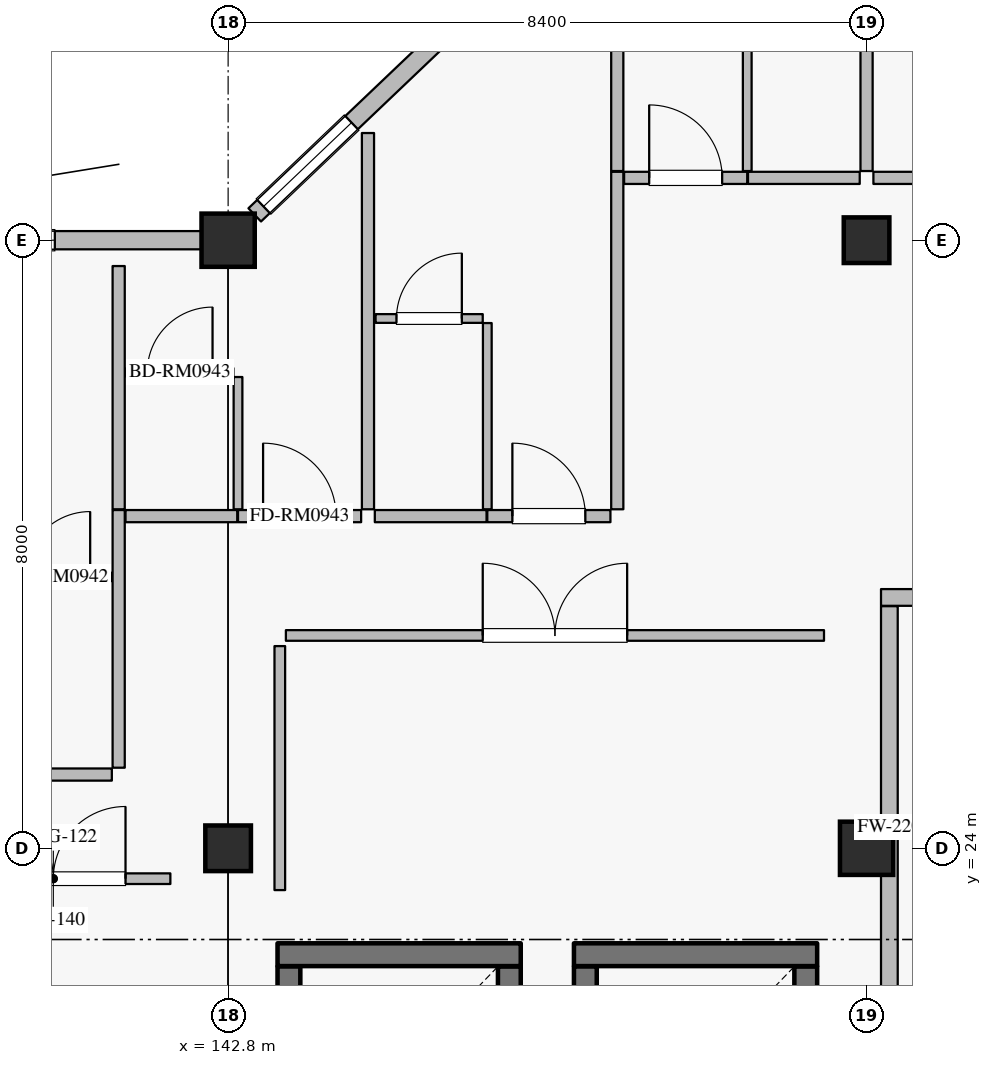
"""IFC4 building model, lengths in metres.
Left out: names, types, materials, properties, quantities, classifications, styles, units other than length and angle.
Written with IfcOpenShell. Run it as: python <this file> out.ifc"""

import sys

from ifc_helpers import new_model, si_unit, direction, frame, frame_2d, origin, origin_2d, place, context, subcontext, project, spatial, rectangle, extrude, element, fill, save


model = new_model("IFC4")
c1 = context("Model", 3, precision=1e-05, world=origin(), true_north=direction((0.0, 1.0)))
c2 = subcontext(c1, "Body", "Model", "MODEL_VIEW")
j1 = project(units=[si_unit("LENGTHUNIT", "METRE"), si_unit("PLANEANGLEUNIT", "RADIAN")], contexts=[c1])
p1 = place(None, origin())
s1 = spatial("IfcSite", under=j1, at=p1, CompositionType="ELEMENT")
p2 = place(p1, origin())
s2 = spatial("IfcBuilding", under=s1, at=p2, CompositionType="ELEMENT")
p3 = place(p2, frame((0.0, 0.0, 36.0)))
s3 = spatial("IfcBuildingStorey", under=s2, at=p3, CompositionType="ELEMENT", Elevation=36.0)
for number, where, z_axis, x_axis in (
    (1, (142.8, 32.0, 0.0), (0.0, 0.0, 1.0), (1.0, 0.0, 0.0)),
    (2, (151.2, 24.0, 0.0), (0.0, 0.0, 1.0), (1.0, 0.0, 0.0)),
):
    element("IfcColumn", number, at=place(p3, frame(where, z_axis=z_axis, x_axis=x_axis)), inside=s3, PredefinedType="COLUMN", context=c2, shape_type="SweptSolid", body=[
        extrude(rectangle(XDim=0.7, YDim=0.7, at=origin_2d()), origin(), (0.0, 0.0, 1.0), 3.6),
    ])
for number, where, z_axis, x_axis in (
    (3, (142.8, 24.0, 0.0), (0.0, 0.0, 1.0), (1.0, 0.0, 0.0)),
    (4, (151.2, 32.0, 0.0), (0.0, 0.0, 1.0), (1.0, 0.0, 0.0)),
):
    element("IfcColumn", number, at=place(p3, frame(where, z_axis=z_axis, x_axis=x_axis)), inside=s3, PredefinedType="COLUMN", context=c2, shape_type="SweptSolid", body=[
        extrude(rectangle(XDim=0.6, YDim=0.6, at=origin_2d()), origin(), (0.0, 0.0, 1.0), 3.6),
    ])
p4 = place(p3, frame((134.75, 32.0, 0.0), z_axis=(0.0, 0.0, 1.0), x_axis=(1.0, 0.0, 0.0)))
e5 = element("IfcWall", 5, at=p4, inside=s3, PredefinedType="SOLIDWALL", context=c2, shape_type="SweptSolid", body=[
    extrude(rectangle(XDim=7.7, YDim=0.24, at=frame_2d((3.85, 0.0))), origin(), (0.0, 0.0, 1.0), 2.94),
])
p5 = place(p4, frame((0.89, 0.0, 0.8)))
e6 = element("IfcOpeningElement", 6, at=p5, cuts=e5, PredefinedType="OPENING", context=c2, shape_type="SweptSolid", body=[
    extrude(rectangle(XDim=1.6, YDim=1.6, at=frame_2d((0.8, 0.8))), frame((0.0, 0.13, 0.0), z_axis=(0.0, -1.0, 0.0), x_axis=(1.0, 0.0, 0.0)), (0.0, 0.0, 1.0), 0.26),
])
p6 = place(p4, frame((4.17, 0.0, 0.8)))
e7 = element("IfcOpeningElement", 7, at=p6, cuts=e5, PredefinedType="OPENING", context=c2, shape_type="SweptSolid", body=[
    extrude(rectangle(XDim=1.6, YDim=1.6, at=frame_2d((0.8, 0.8))), frame((0.0, 0.13, 0.0), z_axis=(0.0, -1.0, 0.0), x_axis=(1.0, 0.0, 0.0)), (0.0, 0.0, 1.0), 0.26),
])
p7 = place(p3, frame((143.15, 32.333, 0.0), z_axis=(0.0, 0.0, 1.0), x_axis=(0.724116091282, 0.689678103427, 0.0)))
e8 = element("IfcWall", 8, at=p7, inside=s3, PredefinedType="SOLIDWALL", context=c2, shape_type="SweptSolid", body=[
    extrude(rectangle(XDim=10.634, YDim=0.24, at=frame_2d((5.317, 0.0))), origin(), (0.0, 0.0, 1.0), 2.94),
])
p8 = place(p7, frame((0.16, 0.0, 0.8)))
e9 = element("IfcOpeningElement", 9, at=p8, cuts=e8, PredefinedType="OPENING", context=c2, shape_type="SweptSolid", body=[
    extrude(rectangle(XDim=1.6, YDim=1.6, at=frame_2d((0.8, 0.8))), frame((0.0, 0.13, 0.0), z_axis=(0.0, -1.0, 0.0), x_axis=(1.0, 0.0, 0.0)), (0.0, 0.0, 1.0), 0.26),
])
p9 = place(p7, frame((3.523, 0.0, 0.8)))
e10 = element("IfcOpeningElement", 10, at=p9, cuts=e8, PredefinedType="OPENING", context=c2, shape_type="SweptSolid", body=[
    extrude(rectangle(XDim=1.6, YDim=1.6, at=frame_2d((0.8, 0.8))), frame((0.0, 0.13, 0.0), z_axis=(0.0, -1.0, 0.0), x_axis=(1.0, 0.0, 0.0)), (0.0, 0.0, 1.0), 0.26),
])
p10 = place(p7, frame((7.88, 0.0, 0.8)))
e11 = element("IfcOpeningElement", 11, at=p10, cuts=e8, PredefinedType="OPENING", context=c2, shape_type="SweptSolid", body=[
    extrude(rectangle(XDim=1.6, YDim=1.6, at=frame_2d((0.8, 0.8))), frame((0.0, 0.13, 0.0), z_axis=(0.0, -1.0, 0.0), x_axis=(1.0, 0.0, 0.0)), (0.0, 0.0, 1.0), 0.26),
])
p11 = place(p3, frame((146.5, 19.755, 0.0), z_axis=(0.0, 0.0, 1.0), x_axis=(0.0, 1.0, 0.0)))
e12 = element("IfcWall", 12, at=p11, inside=s3, PredefinedType="SHEAR", context=c2, shape_type="SweptSolid", body=[
    extrude(rectangle(XDim=2.69, YDim=0.3, at=frame_2d((1.345, 0.0))), origin(), (0.0, 0.0, 1.0), 3.365),
])
p12 = place(p3, frame((146.65, 22.6, 0.0), z_axis=(0.0, 0.0, 1.0), x_axis=(-1.0, 0.0, 0.0)))
e13 = element("IfcWall", 13, at=p12, inside=s3, PredefinedType="SHEAR", context=c2, shape_type="SweptSolid", body=[
    extrude(rectangle(XDim=3.2, YDim=0.3, at=frame_2d((1.6, 0.0))), origin(), (0.0, 0.0, 1.0), 3.365),
])
for number, where, z_axis, x_axis in (
    (14, (143.6, 22.445, 0.0), (0.0, 0.0, 1.0), (0.0, -1.0, 0.0)),
    (15, (150.4, 19.755, 0.0), (0.0, 0.0, 1.0), (0.0, 1.0, 0.0)),
):
    element("IfcWall", number, at=place(p3, frame(where, z_axis=z_axis, x_axis=x_axis)), inside=s3, PredefinedType="SHEAR", context=c2, shape_type="SweptSolid", body=[
        extrude(rectangle(XDim=2.69, YDim=0.3, at=frame_2d((1.345, 0.0))), origin(), (0.0, 0.0, 1.0), 3.365),
    ])
p13 = place(p3, frame((150.55, 22.6, 0.0), z_axis=(0.0, 0.0, 1.0), x_axis=(-1.0, 0.0, 0.0)))
e16 = element("IfcWall", 16, at=p13, inside=s3, PredefinedType="SHEAR", context=c2, shape_type="SweptSolid", body=[
    extrude(rectangle(XDim=3.2, YDim=0.3, at=frame_2d((1.6, 0.0))), origin(), (0.0, 0.0, 1.0), 3.365),
])
p14 = place(p3, frame((147.5, 22.445, 0.0), z_axis=(0.0, 0.0, 1.0), x_axis=(0.0, -1.0, 0.0)))
e17 = element("IfcWall", 17, at=p14, inside=s3, PredefinedType="SHEAR", context=c2, shape_type="SweptSolid", body=[
    extrude(rectangle(XDim=2.69, YDim=0.3, at=frame_2d((1.345, 0.0))), origin(), (0.0, 0.0, 1.0), 3.365),
])
p15 = place(p3, frame((151.5, 21.365, 0.0), z_axis=(0.0, 0.0, 1.0), x_axis=(0.0, 1.0, 0.0)))
e18 = element("IfcWall", 18, at=p15, inside=s3, PredefinedType="PARTITIONING", context=c2, shape_type="SweptSolid", body=[
    extrude(rectangle(XDim=5.82, YDim=0.22, at=frame_2d((2.91, 0.0))), origin(), (0.0, 0.0, 1.0), 3.365),
])
p16 = place(p3, frame((151.39, 27.3, 0.0), z_axis=(0.0, 0.0, 1.0), x_axis=(1.0, 0.0, 0.0)))
e19 = element("IfcWall", 19, at=p16, inside=s3, PredefinedType="PARTITIONING", context=c2, shape_type="SweptSolid", body=[
    extrude(rectangle(XDim=3.82, YDim=0.22, at=frame_2d((1.91, 0.0))), origin(), (0.0, 0.0, 1.0), 3.365),
])
p17 = place(p16, frame((1.35, 0.0, 0.0)))
e20 = element("IfcOpeningElement", 20, at=p17, cuts=e19, PredefinedType="OPENING", context=c2, shape_type="SweptSolid", body=[
    extrude(rectangle(XDim=1.12, YDim=2.2, at=frame_2d((0.56, 1.1))), frame((0.0, 0.12, 0.0), z_axis=(0.0, -1.0, 0.0), x_axis=(1.0, 0.0, 0.0)), (0.0, 0.0, 1.0), 0.24),
])
p18 = place(p3, frame((139.8, 24.97, 0.0), z_axis=(0.0, 0.0, 1.0), x_axis=(1.0, 0.0, 0.0)))
e21 = element("IfcWall", 21, at=p18, inside=s3, PredefinedType="PARTITIONING", context=c2, shape_type="SweptSolid", body=[
    extrude(rectangle(XDim=1.47, YDim=0.16, at=frame_2d((0.735, 0.0))), origin(), (0.0, 0.0, 1.0), 3.365),
])
p19 = place(p3, frame((139.85, 27.57, 0.0), z_axis=(0.0, 0.0, 1.0), x_axis=(1.0, 0.0, 0.0)))
e22 = element("IfcWall", 22, at=p19, inside=s3, PredefinedType="PARTITIONING", context=c2, shape_type="SweptSolid", body=[
    extrude(rectangle(XDim=1.41, YDim=0.115, at=frame_2d((0.705, 0.0))), origin(), (0.0, 0.0, 1.0), 3.365),
])
p20 = place(p19, frame((0.275, 0.0, 0.0)))
e23 = element("IfcOpeningElement", 23, at=p20, cuts=e22, PredefinedType="OPENING", context=c2, shape_type="SweptSolid", body=[
    extrude(rectangle(XDim=0.86, YDim=2.12, at=frame_2d((0.43, 1.06))), frame((0.0, 0.067, 0.0), z_axis=(0.0, -1.0, 0.0), x_axis=(1.0, 0.0, 0.0)), (0.0, 0.0, 1.0), 0.135),
])
p21 = place(p3, frame((141.36, 25.06, 0.0), z_axis=(0.0, 0.0, 1.0), x_axis=(0.0, 1.0, 0.0)))
e24 = element("IfcWall", 24, at=p21, inside=s3, PredefinedType="PARTITIONING", context=c2, shape_type="SweptSolid", body=[
    extrude(rectangle(XDim=3.39, YDim=0.16, at=frame_2d((1.695, 0.0))), origin(), (0.0, 0.0, 1.0), 3.365),
])
p22 = place(p3, frame((141.45, 28.37, 0.0), z_axis=(0.0, 0.0, 1.0), x_axis=(1.0, 0.0, 0.0)))
e25 = element("IfcWall", 25, at=p22, inside=s3, PredefinedType="PARTITIONING", context=c2, shape_type="SweptSolid", body=[
    extrude(rectangle(XDim=1.47, YDim=0.16, at=frame_2d((0.735, 0.0))), origin(), (0.0, 0.0, 1.0), 3.365),
])
p23 = place(p3, frame((142.93, 28.37, 0.0), z_axis=(0.0, 0.0, 1.0), x_axis=(1.0, 0.0, 0.0)))
e26 = element("IfcWall", 26, at=p23, inside=s3, PredefinedType="PARTITIONING", context=c2, shape_type="SweptSolid", body=[
    extrude(rectangle(XDim=1.62, YDim=0.16, at=frame_2d((0.81, 0.0))), origin(), (0.0, 0.0, 1.0), 3.365),
])
p24 = place(p23, frame((0.33, 0.0, 0.0)))
e27 = element("IfcOpeningElement", 27, at=p24, cuts=e26, PredefinedType="OPENING", context=c2, shape_type="SweptSolid", body=[
    extrude(rectangle(XDim=0.96, YDim=2.2, at=frame_2d((0.48, 1.1))), frame((0.0, 0.09, 0.0), z_axis=(0.0, -1.0, 0.0), x_axis=(1.0, 0.0, 0.0)), (0.0, 0.0, 1.0), 0.18),
])
p25 = place(p3, frame((142.93, 28.46, 0.0), z_axis=(0.0, 0.0, 1.0), x_axis=(0.0, 1.0, 0.0)))
e28 = element("IfcWall", 28, at=p25, inside=s3, PredefinedType="PARTITIONING", context=c2, shape_type="SweptSolid", body=[
    extrude(rectangle(XDim=1.74, YDim=0.115, at=frame_2d((0.87, 0.0))), origin(), (0.0, 0.0, 1.0), 2.74),
])
p26 = place(p3, frame((141.46, 30.26, 0.0), z_axis=(0.0, 0.0, 1.0), x_axis=(1.0, 0.0, 0.0)))
e29 = element("IfcWall", 29, at=p26, inside=s3, PredefinedType="PARTITIONING", context=c2, shape_type="SweptSolid", body=[
    extrude(rectangle(XDim=1.41, YDim=0.115, at=frame_2d((0.705, 0.0))), origin(), (0.0, 0.0, 1.0), 3.365),
])
p27 = place(p26, frame((0.275, 0.0, 0.0)))
e30 = element("IfcOpeningElement", 30, at=p27, cuts=e29, PredefinedType="OPENING", context=c2, shape_type="SweptSolid", body=[
    extrude(rectangle(XDim=0.86, YDim=2.12, at=frame_2d((0.43, 1.06))), frame((0.0, 0.067, 0.0), z_axis=(0.0, -1.0, 0.0), x_axis=(1.0, 0.0, 0.0)), (0.0, 0.0, 1.0), 0.135),
])
p28 = place(p3, frame((141.36, 28.46, 0.0), z_axis=(0.0, 0.0, 1.0), x_axis=(0.0, 1.0, 0.0)))
e31 = element("IfcWall", 31, at=p28, inside=s3, PredefinedType="PARTITIONING", context=c2, shape_type="SweptSolid", body=[
    extrude(rectangle(XDim=3.2, YDim=0.16, at=frame_2d((1.6, 0.0))), origin(), (0.0, 0.0, 1.0), 3.365),
])
p29 = place(p3, frame((144.73, 28.37, 0.0), z_axis=(0.0, 0.0, 1.0), x_axis=(1.0, 0.0, 0.0)))
e32 = element("IfcWall", 32, at=p29, inside=s3, PredefinedType="PARTITIONING", context=c2, shape_type="SweptSolid", body=[
    extrude(rectangle(XDim=1.47, YDim=0.16, at=frame_2d((0.735, 0.0))), origin(), (0.0, 0.0, 1.0), 3.365),
])
p30 = place(p3, frame((146.21, 28.37, 0.0), z_axis=(0.0, 0.0, 1.0), x_axis=(1.0, 0.0, 0.0)))
e33 = element("IfcWall", 33, at=p30, inside=s3, PredefinedType="PARTITIONING", context=c2, shape_type="SweptSolid", body=[
    extrude(rectangle(XDim=1.62, YDim=0.16, at=frame_2d((0.81, 0.0))), origin(), (0.0, 0.0, 1.0), 3.365),
])
p31 = place(p30, frame((0.33, 0.0, 0.0)))
e34 = element("IfcOpeningElement", 34, at=p31, cuts=e33, PredefinedType="OPENING", context=c2, shape_type="SweptSolid", body=[
    extrude(rectangle(XDim=0.96, YDim=2.2, at=frame_2d((0.48, 1.1))), frame((0.0, 0.09, 0.0), z_axis=(0.0, -1.0, 0.0), x_axis=(1.0, 0.0, 0.0)), (0.0, 0.0, 1.0), 0.18),
])
p32 = place(p3, frame((146.21, 28.46, 0.0), z_axis=(0.0, 0.0, 1.0), x_axis=(0.0, 1.0, 0.0)))
e35 = element("IfcWall", 35, at=p32, inside=s3, PredefinedType="PARTITIONING", context=c2, shape_type="SweptSolid", body=[
    extrude(rectangle(XDim=2.45, YDim=0.115, at=frame_2d((1.225, 0.0))), origin(), (0.0, 0.0, 1.0), 3.365),
])
p33 = place(p3, frame((144.74, 30.97, 0.0), z_axis=(0.0, 0.0, 1.0), x_axis=(1.0, 0.0, 0.0)))
e36 = element("IfcWall", 36, at=p33, inside=s3, PredefinedType="PARTITIONING", context=c2, shape_type="SweptSolid", body=[
    extrude(rectangle(XDim=1.41, YDim=0.115, at=frame_2d((0.705, 0.0))), origin(), (0.0, 0.0, 1.0), 3.365),
])
p34 = place(p33, frame((0.275, 0.0, 0.0)))
e37 = element("IfcOpeningElement", 37, at=p34, cuts=e36, PredefinedType="OPENING", context=c2, shape_type="SweptSolid", body=[
    extrude(rectangle(XDim=0.86, YDim=2.12, at=frame_2d((0.43, 1.06))), frame((0.0, 0.067, 0.0), z_axis=(0.0, -1.0, 0.0), x_axis=(1.0, 0.0, 0.0)), (0.0, 0.0, 1.0), 0.135),
])
p35 = place(p3, frame((144.64, 28.46, 0.0), z_axis=(0.0, 0.0, 1.0), x_axis=(0.0, 1.0, 0.0)))
e38 = element("IfcWall", 38, at=p35, inside=s3, PredefinedType="PARTITIONING", context=c2, shape_type="SweptSolid", body=[
    extrude(rectangle(XDim=4.95, YDim=0.16, at=frame_2d((2.475, 0.0))), origin(), (0.0, 0.0, 1.0), 3.365),
])
p36 = place(p3, frame((147.92, 28.46, 0.0), z_axis=(0.0, 0.0, 1.0), x_axis=(0.0, 1.0, 0.0)))
e39 = element("IfcWall", 39, at=p36, inside=s3, PredefinedType="PARTITIONING", context=c2, shape_type="SweptSolid", body=[
    extrude(rectangle(XDim=4.44, YDim=0.16, at=frame_2d((2.22, 0.0))), origin(), (0.0, 0.0, 1.0), 3.365),
])
p37 = place(p3, frame((148.01, 32.82, 0.0), z_axis=(0.0, 0.0, 1.0), x_axis=(1.0, 0.0, 0.0)))
e40 = element("IfcWall", 40, at=p37, inside=s3, PredefinedType="PARTITIONING", context=c2, shape_type="SweptSolid", body=[
    extrude(rectangle(XDim=1.62, YDim=0.16, at=frame_2d((0.81, 0.0))), origin(), (0.0, 0.0, 1.0), 3.365),
])
p38 = place(p37, frame((0.33, 0.0, 0.0)))
e41 = element("IfcOpeningElement", 41, at=p38, cuts=e40, PredefinedType="OPENING", context=c2, shape_type="SweptSolid", body=[
    extrude(rectangle(XDim=0.96, YDim=2.2, at=frame_2d((0.48, 1.1))), frame((0.0, 0.09, 0.0), z_axis=(0.0, -1.0, 0.0), x_axis=(1.0, 0.0, 0.0)), (0.0, 0.0, 1.0), 0.18),
])
p39 = place(p3, frame((149.64, 32.82, 0.0), z_axis=(0.0, 0.0, 1.0), x_axis=(1.0, 0.0, 0.0)))
e42 = element("IfcWall", 42, at=p39, inside=s3, PredefinedType="PARTITIONING", context=c2, shape_type="SweptSolid", body=[
    extrude(rectangle(XDim=1.47, YDim=0.16, at=frame_2d((0.735, 0.0))), origin(), (0.0, 0.0, 1.0), 3.365),
])
p40 = place(p3, frame((149.63, 32.91, 0.0), z_axis=(0.0, 0.0, 1.0), x_axis=(0.0, 1.0, 0.0)))
e43 = element("IfcWall", 43, at=p40, inside=s3, PredefinedType="PARTITIONING", context=c2, shape_type="SweptSolid", body=[
    extrude(rectangle(XDim=2.17, YDim=0.115, at=frame_2d((1.085, 0.0))), origin(), (0.0, 0.0, 1.0), 3.365),
])
p41 = place(p3, frame((147.92, 32.91, 0.0), z_axis=(0.0, 0.0, 1.0), x_axis=(0.0, 1.0, 0.0)))
e44 = element("IfcWall", 44, at=p41, inside=s3, PredefinedType="PARTITIONING", context=c2, shape_type="SweptSolid", body=[
    extrude(rectangle(XDim=3.63, YDim=0.16, at=frame_2d((1.815, 0.0))), origin(), (0.0, 0.0, 1.0), 3.365),
])
p42 = place(p3, frame((151.29, 32.82, 0.0), z_axis=(0.0, 0.0, 1.0), x_axis=(1.0, 0.0, 0.0)))
e45 = element("IfcWall", 45, at=p42, inside=s3, PredefinedType="PARTITIONING", context=c2, shape_type="SweptSolid", body=[
    extrude(rectangle(XDim=1.45, YDim=0.16, at=frame_2d((0.725, 0.0))), origin(), (0.0, 0.0, 1.0), 3.365),
])
p43 = place(p3, frame((151.2, 32.91, 0.0), z_axis=(0.0, 0.0, 1.0), x_axis=(0.0, 1.0, 0.0)))
e46 = element("IfcWall", 46, at=p43, inside=s3, PredefinedType="PARTITIONING", context=c2, shape_type="SweptSolid", body=[
    extrude(rectangle(XDim=6.75, YDim=0.16, at=frame_2d((3.375, 0.0))), origin(), (0.0, 0.0, 1.0), 2.74),
])
p44 = place(p3, frame((138.96, 23.6, 0.0), z_axis=(0.0, 0.0, 1.0), x_axis=(1.0, 0.0, 0.0)))
e47 = element("IfcWall", 47, at=p44, inside=s3, PredefinedType="PARTITIONING", context=c2, shape_type="SweptSolid", body=[
    extrude(rectangle(XDim=3.08, YDim=0.14, at=frame_2d((1.54, 0.0))), origin(), (0.0, 0.0, 1.0), 3.365),
])
p45 = place(p44, frame((0.59, 0.0, 0.0)))
e48 = element("IfcOpeningElement", 48, at=p45, cuts=e47, PredefinedType="OPENING", context=c2, shape_type="SweptSolid", body=[
    extrude(rectangle(XDim=1.9, YDim=2.4, at=frame_2d((0.95, 1.2))), frame((0.0, 0.08, 0.0), z_axis=(0.0, -1.0, 0.0), x_axis=(1.0, 0.0, 0.0)), (0.0, 0.0, 1.0), 0.16),
])
p46 = place(p3, frame((143.56, 26.8, 0.0), z_axis=(0.0, 0.0, 1.0), x_axis=(1.0, 0.0, 0.0)))
e49 = element("IfcWall", 49, at=p46, inside=s3, PredefinedType="PARTITIONING", context=c2, shape_type="SweptSolid", body=[
    extrude(rectangle(XDim=7.08, YDim=0.14, at=frame_2d((3.54, 0.0))), origin(), (0.0, 0.0, 1.0), 3.365),
])
p47 = place(p46, frame((2.59, 0.0, 0.0)))
e50 = element("IfcOpeningElement", 50, at=p47, cuts=e49, PredefinedType="OPENING", context=c2, shape_type="SweptSolid", body=[
    extrude(rectangle(XDim=1.9, YDim=2.4, at=frame_2d((0.95, 1.2))), frame((0.0, 0.08, 0.0), z_axis=(0.0, -1.0, 0.0), x_axis=(1.0, 0.0, 0.0)), (0.0, 0.0, 1.0), 0.16),
])
p48 = place(p3, frame((143.48, 23.45, 0.0), z_axis=(0.0, 0.0, 1.0), x_axis=(0.0, 1.0, 0.0)))
e51 = element("IfcWall", 51, at=p48, inside=s3, PredefinedType="PARTITIONING", context=c2, shape_type="SweptSolid", body=[
    extrude(rectangle(XDim=3.21, YDim=0.14, at=frame_2d((1.605, 0.0))), origin(), (0.0, 0.0, 1.0), 3.365),
])
p49 = place(p6, origin())
e52 = element("IfcWindow", 52, at=p49, inside=s3, PartitioningType="SINGLE_PANEL", PredefinedType="WINDOW", context=c2, shape_type="SweptSolid", body=[
    extrude(rectangle(XDim=1.6, YDim=1.6, at=frame_2d((0.8, 0.8))), frame((0.0, 0.03, 0.0), z_axis=(0.0, -1.0, 0.0), x_axis=(1.0, 0.0, 0.0)), (0.0, 0.0, 1.0), 0.06),
])
fill(e7, e52)
p50 = place(p8, origin())
e53 = element("IfcWindow", 53, at=p50, inside=s3, PartitioningType="SINGLE_PANEL", PredefinedType="WINDOW", context=c2, shape_type="SweptSolid", body=[
    extrude(rectangle(XDim=1.6, YDim=1.6, at=frame_2d((0.8, 0.8))), frame((0.0, 0.03, 0.0), z_axis=(0.0, -1.0, 0.0), x_axis=(1.0, 0.0, 0.0)), (0.0, 0.0, 1.0), 0.06),
])
fill(e9, e53)
p51 = place(p20, origin())
e54 = element("IfcDoor", 54, at=p51, inside=s3, OperationType="SINGLE_SWING_RIGHT", PredefinedType="DOOR", context=c2, shape_type="SweptSolid", body=[
    extrude(rectangle(XDim=0.86, YDim=2.12, at=frame_2d((0.43, 1.06))), frame((0.0, 0.025, 0.0), z_axis=(0.0, -1.0, 0.0), x_axis=(1.0, 0.0, 0.0)), (0.0, 0.0, 1.0), 0.05),
])
fill(e23, e54)
p52 = place(p24, origin())
e55 = element("IfcDoor", 55, at=p52, inside=s3, OperationType="SINGLE_SWING_LEFT", PredefinedType="DOOR", context=c2, shape_type="SweptSolid", body=[
    extrude(rectangle(XDim=0.96, YDim=2.2, at=frame_2d((0.48, 1.1))), frame((0.0, 0.025, 0.0), z_axis=(0.0, -1.0, 0.0), x_axis=(1.0, 0.0, 0.0)), (0.0, 0.0, 1.0), 0.05),
])
fill(e27, e55)
p53 = place(p27, origin())
e56 = element("IfcDoor", 56, at=p53, inside=s3, OperationType="SINGLE_SWING_RIGHT", PredefinedType="DOOR", context=c2, shape_type="SweptSolid", body=[
    extrude(rectangle(XDim=0.86, YDim=2.12, at=frame_2d((0.43, 1.06))), frame((0.0, 0.025, 0.0), z_axis=(0.0, -1.0, 0.0), x_axis=(1.0, 0.0, 0.0)), (0.0, 0.0, 1.0), 0.05),
])
fill(e30, e56)
p54 = place(p31, origin())
e57 = element("IfcDoor", 57, at=p54, inside=s3, OperationType="SINGLE_SWING_LEFT", PredefinedType="DOOR", context=c2, shape_type="SweptSolid", body=[
    extrude(rectangle(XDim=0.96, YDim=2.2, at=frame_2d((0.48, 1.1))), frame((0.0, 0.025, 0.0), z_axis=(0.0, -1.0, 0.0), x_axis=(1.0, 0.0, 0.0)), (0.0, 0.0, 1.0), 0.05),
])
fill(e34, e57)
p55 = place(p34, origin())
e58 = element("IfcDoor", 58, at=p55, inside=s3, OperationType="SINGLE_SWING_RIGHT", PredefinedType="DOOR", context=c2, shape_type="SweptSolid", body=[
    extrude(rectangle(XDim=0.86, YDim=2.12, at=frame_2d((0.43, 1.06))), frame((0.0, 0.025, 0.0), z_axis=(0.0, -1.0, 0.0), x_axis=(1.0, 0.0, 0.0)), (0.0, 0.0, 1.0), 0.05),
])
fill(e37, e58)
p56 = place(p38, origin())
e59 = element("IfcDoor", 59, at=p56, inside=s3, OperationType="SINGLE_SWING_LEFT", PredefinedType="DOOR", context=c2, shape_type="SweptSolid", body=[
    extrude(rectangle(XDim=0.96, YDim=2.2, at=frame_2d((0.48, 1.1))), frame((0.0, 0.025, 0.0), z_axis=(0.0, -1.0, 0.0), x_axis=(1.0, 0.0, 0.0)), (0.0, 0.0, 1.0), 0.05),
])
fill(e41, e59)
p57 = place(p45, origin())
e60 = element("IfcDoor", 60, at=p57, inside=s3, OperationType="DOUBLE_DOOR_SINGLE_SWING", PredefinedType="DOOR", context=c2, shape_type="SweptSolid", body=[
    extrude(rectangle(XDim=1.9, YDim=2.4, at=frame_2d((0.95, 1.2))), frame((0.0, 0.025, 0.0), z_axis=(0.0, -1.0, 0.0), x_axis=(1.0, 0.0, 0.0)), (0.0, 0.0, 1.0), 0.05),
])
fill(e48, e60)
p58 = place(p47, origin())
e61 = element("IfcDoor", 61, at=p58, inside=s3, OperationType="DOUBLE_DOOR_SINGLE_SWING", PredefinedType="DOOR", context=c2, shape_type="SweptSolid", body=[
    extrude(rectangle(XDim=1.9, YDim=2.4, at=frame_2d((0.95, 1.2))), frame((0.0, 0.025, 0.0), z_axis=(0.0, -1.0, 0.0), x_axis=(1.0, 0.0, 0.0)), (0.0, 0.0, 1.0), 0.05),
])
fill(e50, e61)
save(model, sys.argv[1])
